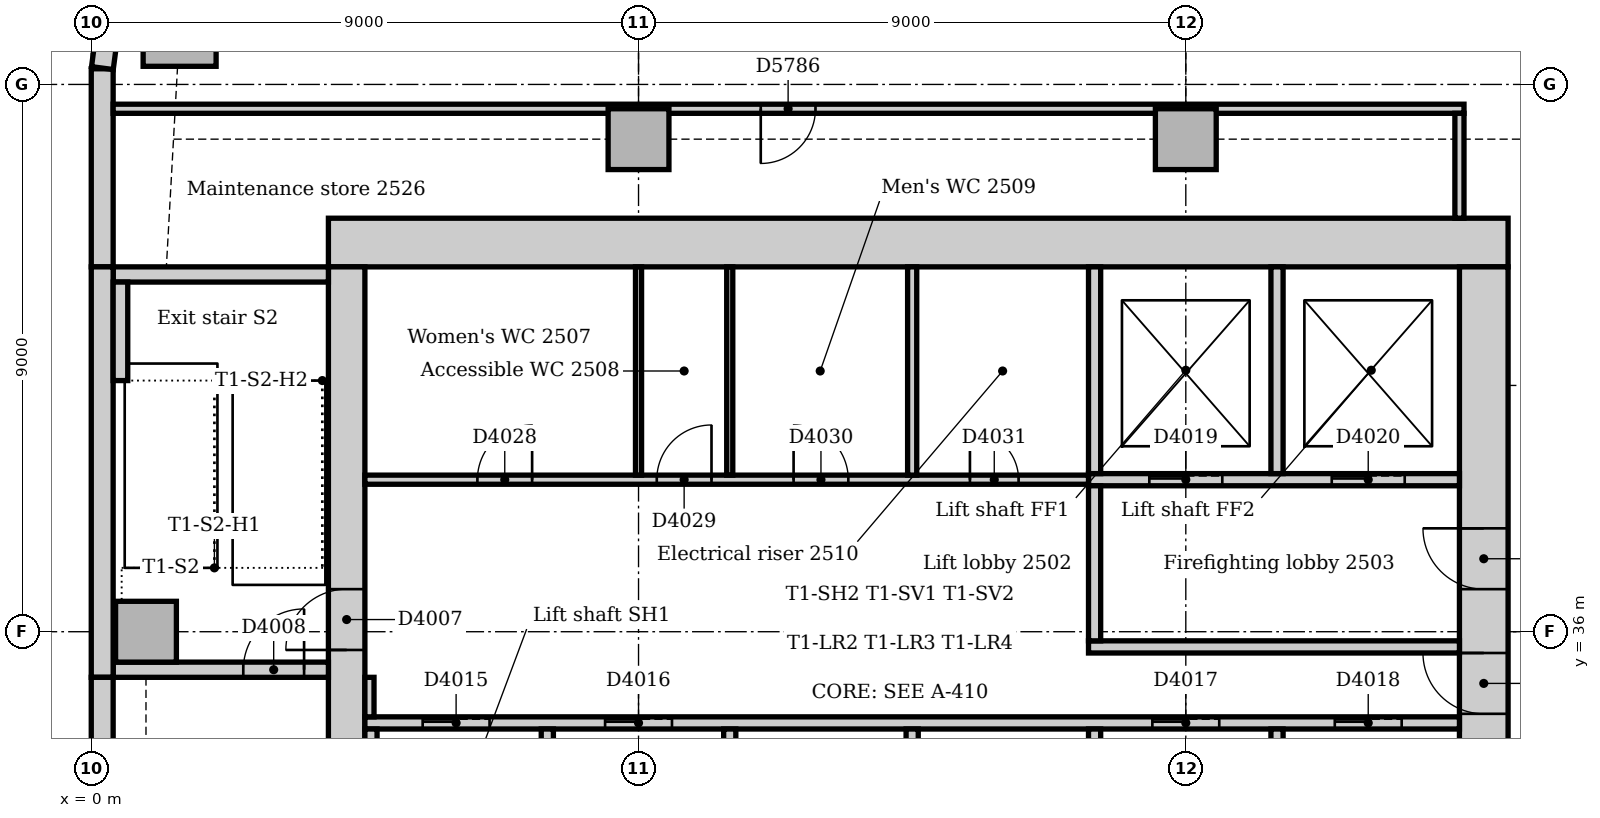
"""IFC4 building model, lengths in metres.
Left out: names, types, materials, properties, quantities, classifications, styles, units other than length and angle.
Written with IfcOpenShell. Run it as: python <this file> out.ifc"""

import sys

from ifc_helpers import new_model, si_unit, direction, frame, frame_2d, origin, origin_2d, place, context, subcontext, project, spatial, rectangle, extrude, element, fill, save


model = new_model("IFC4")
c1 = context("Model", 3, precision=1e-05, world=origin(), true_north=direction((0.0, 1.0)))
c2 = subcontext(c1, "Body", "Model", "MODEL_VIEW")
j1 = project(units=[si_unit("LENGTHUNIT", "METRE"), si_unit("PLANEANGLEUNIT", "RADIAN")], contexts=[c1])
p1 = place(None, origin())
s1 = spatial("IfcSite", under=j1, at=p1, CompositionType="ELEMENT")
p2 = place(p1, origin())
s2 = spatial("IfcBuilding", under=s1, at=p2, CompositionType="ELEMENT")
p3 = place(p2, frame((0.0, 0.0, 108.0)))
s3 = spatial("IfcBuildingStorey", under=s2, at=p3, CompositionType="ELEMENT", Elevation=108.0)
p4 = place(p3, frame((23.3, 42.4, 0.0), z_axis=(0.0, 0.0, 1.0), x_axis=(-1.0, 0.0, 0.0)))
e1 = element("IfcWall", 1, at=p4, inside=s3, PredefinedType="SOLIDWALL", context=c2, shape_type="SweptSolid", body=[
    extrude(rectangle(XDim=19.4, YDim=0.8, at=frame_2d((9.7, 0.0))), origin(), (0.0, 0.0, 1.0), 4.0),
])
p5 = place(p3, frame((22.9, 31.5, 0.0), z_axis=(0.0, 0.0, 1.0), x_axis=(0.0, 1.0, 0.0)))
e2 = element("IfcWall", 2, at=p5, inside=s3, PredefinedType="SOLIDWALL", context=c2, shape_type="SweptSolid", body=[
    extrude(rectangle(XDim=10.5, YDim=0.8, at=frame_2d((5.25, 0.0))), origin(), (0.0, 0.0, 1.0), 4.0),
])
p6 = place(p5, frame((3.15, 0.0, 0.0)))
e3 = element("IfcOpeningElement", 3, at=p6, cuts=e2, PredefinedType="OPENING", context=c2, shape_type="SweptSolid", body=[
    extrude(rectangle(XDim=1.0, YDim=2.1, at=frame_2d((0.5, 1.05))), frame((0.0, 0.41, 0.0), z_axis=(0.0, -1.0, 0.0), x_axis=(1.0, 0.0, 0.0)), (0.0, 0.0, 1.0), 0.82),
])
p7 = place(p5, frame((5.2, 0.0, 0.0)))
e4 = element("IfcOpeningElement", 4, at=p7, cuts=e2, PredefinedType="OPENING", context=c2, shape_type="SweptSolid", body=[
    extrude(rectangle(XDim=1.0, YDim=2.1, at=frame_2d((0.5, 1.05))), frame((0.0, 0.41, 0.0), z_axis=(0.0, -1.0, 0.0), x_axis=(1.0, 0.0, 0.0)), (0.0, 0.0, 1.0), 0.82),
])
p8 = place(p3, frame((4.2, 42.0, 0.0), z_axis=(0.0, 0.0, 1.0), x_axis=(0.0, -1.0, 0.0)))
e5 = element("IfcWall", 5, at=p8, inside=s3, PredefinedType="SOLIDWALL", context=c2, shape_type="SweptSolid", body=[
    extrude(rectangle(XDim=10.5, YDim=0.6, at=frame_2d((5.25, 0.0))), origin(), (0.0, 0.0, 1.0), 4.0),
])
p9 = place(p8, frame((5.3, 0.0, 0.0)))
e6 = element("IfcOpeningElement", 6, at=p9, cuts=e5, PredefinedType="OPENING", context=c2, shape_type="SweptSolid", body=[
    extrude(rectangle(XDim=1.0, YDim=2.1, at=frame_2d((0.5, 1.05))), frame((0.0, 0.31, 0.0), z_axis=(0.0, -1.0, 0.0), x_axis=(1.0, 0.0, 0.0)), (0.0, 0.0, 1.0), 0.62),
])
p10 = place(p3, frame((0.36, 35.375, 0.0), z_axis=(0.0, 0.0, 1.0), x_axis=(1.0, 0.0, 0.0)))
e7 = element("IfcWall", 7, at=p10, inside=s3, PredefinedType="SOLIDWALL", context=c2, shape_type="SweptSolid", body=[
    extrude(rectangle(XDim=3.54, YDim=0.25, at=frame_2d((1.77, 0.0))), origin(), (0.0, 0.0, 1.0), 4.0),
])
p11 = place(p10, frame((2.14, 0.0, 0.0)))
e8 = element("IfcOpeningElement", 8, at=p11, cuts=e7, PredefinedType="OPENING", context=c2, shape_type="SweptSolid", body=[
    extrude(rectangle(XDim=1.0, YDim=2.1, at=frame_2d((0.5, 1.05))), frame((0.0, 0.135, 0.0), z_axis=(0.0, -1.0, 0.0), x_axis=(1.0, 0.0, 0.0)), (0.0, 0.0, 1.0), 0.27),
])
p12 = place(p3, frame((3.9, 41.875, 0.0), z_axis=(0.0, 0.0, 1.0), x_axis=(-1.0, 0.0, 0.0)))
e9 = element("IfcWall", 9, at=p12, inside=s3, PredefinedType="SOLIDWALL", context=c2, shape_type="SweptSolid", body=[
    extrude(rectangle(XDim=3.54, YDim=0.25, at=frame_2d((1.77, 0.0))), origin(), (0.0, 0.0, 1.0), 4.0),
])
p13 = place(p3, frame((1.453, 45.898, 0.0), z_axis=(0.0, 0.0, 1.0), x_axis=(1.0, 0.0, 0.0)))
e10 = element("IfcColumn", 10, at=p13, inside=s3, PredefinedType="COLUMN", context=c2, shape_type="SweptSolid", body=[
    extrude(rectangle(XDim=1.2, YDim=1.2, at=origin_2d()), origin(), (0.0, 0.0, 1.0), 3.85),
])
p14 = place(p3, frame((0.9, 36.0, 0.0), z_axis=(0.0, 0.0, 1.0), x_axis=(1.0, 0.0, 0.0)))
e11 = element("IfcColumn", 11, at=p14, inside=s3, PredefinedType="COLUMN", context=c2, shape_type="SweptSolid", body=[
    extrude(rectangle(XDim=1.0, YDim=1.0, at=origin_2d()), origin(), (0.0, 0.0, 1.0), 4.0),
])
for number, where, z_axis, x_axis in (
    (12, (9.0, 44.1, 0.0), (0.0, 0.0, 1.0), (1.0, 0.0, 0.0)),
    (13, (18.0, 44.1, 0.0), (0.0, 0.0, 1.0), (1.0, 0.0, 0.0)),
):
    element("IfcColumn", number, at=place(p3, frame(where, z_axis=z_axis, x_axis=x_axis)), inside=s3, PredefinedType="COLUMN", context=c2, shape_type="SweptSolid", body=[
        extrude(rectangle(XDim=1.0, YDim=1.0, at=origin_2d()), origin(), (0.0, 0.0, 1.0), 3.85),
    ])
p15 = place(p3, frame((0.18, 45.257, 0.0), z_axis=(0.0, 0.0, 1.0), x_axis=(0.0, -1.0, 0.0)))
e14 = element("IfcWall", 14, at=p15, inside=s3, PredefinedType="STANDARD", context=c2, shape_type="SweptSolid", body=[
    extrude(rectangle(XDim=3.257, YDim=0.36, at=frame_2d((1.629, 0.0))), origin(), (0.0, 0.0, 1.0), 3.85),
])
p16 = place(p3, frame((0.18, 42.0, 0.0), z_axis=(0.0, 0.0, 1.0), x_axis=(0.0, -1.0, 0.0)))
e15 = element("IfcWall", 15, at=p16, inside=s3, PredefinedType="STANDARD", context=c2, shape_type="SweptSolid", body=[
    extrude(rectangle(XDim=6.75, YDim=0.36, at=frame_2d((3.375, 0.0))), origin(), (0.0, 0.0, 1.0), 3.85),
])
p17 = place(p3, frame((0.18, 35.25, 0.0), z_axis=(0.0, 0.0, 1.0), x_axis=(0.0, -1.0, 0.0)))
e16 = element("IfcWall", 16, at=p17, inside=s3, PredefinedType="STANDARD", context=c2, shape_type="SweptSolid", body=[
    extrude(rectangle(XDim=7.5, YDim=0.36, at=frame_2d((3.75, 0.0))), origin(), (0.0, 0.0, 1.0), 3.85),
])
p18 = place(p3, frame((0.276, 45.976, 0.0), z_axis=(0.0, 0.0, 1.0), x_axis=(-0.13055608231, -0.99144092581, 0.0)))
e17 = element("IfcWall", 17, at=p18, inside=s3, PredefinedType="STANDARD", context=c2, shape_type="SweptSolid", body=[
    extrude(rectangle(XDim=0.713, YDim=0.36, at=frame_2d((0.356, 0.0))), origin(), (0.0, 0.0, 1.0), 3.85),
])
p19 = place(p3, frame((0.48, 40.13, 0.0), z_axis=(0.0, 0.0, 1.0), x_axis=(0.0, 1.0, 0.0)))
e18 = element("IfcWall", 18, at=p19, inside=s3, PredefinedType="STANDARD", context=c2, shape_type="SweptSolid", body=[
    extrude(rectangle(XDim=1.62, YDim=0.24, at=frame_2d((0.81, 0.0))), origin(), (0.0, 0.0, 1.0), 4.0),
])
p20 = place(p3, frame((16.4, 35.75, 0.0), z_axis=(0.0, 0.0, 1.0), x_axis=(1.0, 0.0, 0.0)))
e19 = element("IfcWall", 19, at=p20, inside=s3, PredefinedType="PARTITIONING", context=c2, shape_type="SweptSolid", body=[
    extrude(rectangle(XDim=6.1, YDim=0.2, at=frame_2d((3.05, 0.0))), origin(), (0.0, 0.0, 1.0), 3.85),
])
p21 = place(p3, frame((16.4, 38.5, 0.0), z_axis=(0.0, 0.0, 1.0), x_axis=(1.0, 0.0, 0.0)))
e20 = element("IfcWall", 20, at=p21, inside=s3, PredefinedType="PARTITIONING", context=c2, shape_type="SweptSolid", body=[
    extrude(rectangle(XDim=6.1, YDim=0.2, at=frame_2d((3.05, 0.0))), origin(), (0.0, 0.0, 1.0), 3.85),
])
p22 = place(p21, frame((1.0, 0.0, 0.0)))
e21 = element("IfcOpeningElement", 21, at=p22, cuts=e20, PredefinedType="OPENING", context=c2, shape_type="SweptSolid", body=[
    extrude(rectangle(XDim=1.2, YDim=2.1, at=frame_2d((0.6, 1.05))), frame((0.0, 0.11, 0.0), z_axis=(0.0, -1.0, 0.0), x_axis=(1.0, 0.0, 0.0)), (0.0, 0.0, 1.0), 0.22),
])
p23 = place(p21, frame((4.0, 0.0, 0.0)))
e22 = element("IfcOpeningElement", 22, at=p23, cuts=e20, PredefinedType="OPENING", context=c2, shape_type="SweptSolid", body=[
    extrude(rectangle(XDim=1.2, YDim=2.1, at=frame_2d((0.6, 1.05))), frame((0.0, 0.11, 0.0), z_axis=(0.0, -1.0, 0.0), x_axis=(1.0, 0.0, 0.0)), (0.0, 0.0, 1.0), 0.22),
])
p24 = place(p3, frame((16.5, 35.85, 0.0), z_axis=(0.0, 0.0, 1.0), x_axis=(0.0, 1.0, 0.0)))
e23 = element("IfcWall", 23, at=p24, inside=s3, PredefinedType="PARTITIONING", context=c2, shape_type="SweptSolid", body=[
    extrude(rectangle(XDim=2.55, YDim=0.2, at=frame_2d((1.275, 0.0))), origin(), (0.0, 0.0, 1.0), 3.85),
])
p25 = place(p3, frame((4.5, 34.5, 0.0), z_axis=(0.0, 0.0, 1.0), x_axis=(1.0, 0.0, 0.0)))
e24 = element("IfcWall", 24, at=p25, inside=s3, PredefinedType="PARTITIONING", context=c2, shape_type="SweptSolid", body=[
    extrude(rectangle(XDim=18.0, YDim=0.2, at=frame_2d((9.0, 0.0))), origin(), (0.0, 0.0, 1.0), 3.85),
])
p26 = place(p25, frame((0.95, 0.0, 0.0)))
e25 = element("IfcOpeningElement", 25, at=p26, cuts=e24, PredefinedType="OPENING", context=c2, shape_type="SweptSolid", body=[
    extrude(rectangle(XDim=1.1, YDim=2.1, at=frame_2d((0.55, 1.05))), frame((0.0, 0.11, 0.0), z_axis=(0.0, -1.0, 0.0), x_axis=(1.0, 0.0, 0.0)), (0.0, 0.0, 1.0), 0.22),
])
p27 = place(p25, frame((3.95, 0.0, 0.0)))
e26 = element("IfcOpeningElement", 26, at=p27, cuts=e24, PredefinedType="OPENING", context=c2, shape_type="SweptSolid", body=[
    extrude(rectangle(XDim=1.1, YDim=2.1, at=frame_2d((0.55, 1.05))), frame((0.0, 0.11, 0.0), z_axis=(0.0, -1.0, 0.0), x_axis=(1.0, 0.0, 0.0)), (0.0, 0.0, 1.0), 0.22),
])
p28 = place(p25, frame((12.95, 0.0, 0.0)))
e27 = element("IfcOpeningElement", 27, at=p28, cuts=e24, PredefinedType="OPENING", context=c2, shape_type="SweptSolid", body=[
    extrude(rectangle(XDim=1.1, YDim=2.1, at=frame_2d((0.55, 1.05))), frame((0.0, 0.11, 0.0), z_axis=(0.0, -1.0, 0.0), x_axis=(1.0, 0.0, 0.0)), (0.0, 0.0, 1.0), 0.22),
])
p29 = place(p25, frame((15.95, 0.0, 0.0)))
e28 = element("IfcOpeningElement", 28, at=p29, cuts=e24, PredefinedType="OPENING", context=c2, shape_type="SweptSolid", body=[
    extrude(rectangle(XDim=1.1, YDim=2.1, at=frame_2d((0.55, 1.05))), frame((0.0, 0.11, 0.0), z_axis=(0.0, -1.0, 0.0), x_axis=(1.0, 0.0, 0.0)), (0.0, 0.0, 1.0), 0.22),
])
for number, where, z_axis, x_axis in (
    (29, (16.5, 38.6, 0.0), (0.0, 0.0, 1.0), (0.0, 1.0, 0.0)),
    (30, (19.5, 38.6, 0.0), (0.0, 0.0, 1.0), (0.0, 1.0, 0.0)),
):
    element("IfcWall", number, at=place(p3, frame(where, z_axis=z_axis, x_axis=x_axis)), inside=s3, PredefinedType="PARTITIONING", context=c2, shape_type="SweptSolid", body=[
        extrude(rectangle(XDim=3.4, YDim=0.2, at=frame_2d((1.7, 0.0))), origin(), (0.0, 0.0, 1.0), 3.85),
    ])
for number, where, z_axis, x_axis in (
    (31, (4.6, 31.75, 0.0), (0.0, 0.0, 1.0), (0.0, 1.0, 0.0)),
    (32, (7.5, 31.75, 0.0), (0.0, 0.0, 1.0), (0.0, 1.0, 0.0)),
    (33, (10.5, 31.75, 0.0), (0.0, 0.0, 1.0), (0.0, 1.0, 0.0)),
    (34, (13.5, 31.75, 0.0), (0.0, 0.0, 1.0), (0.0, 1.0, 0.0)),
    (35, (16.5, 31.75, 0.0), (0.0, 0.0, 1.0), (0.0, 1.0, 0.0)),
    (36, (19.5, 31.75, 0.0), (0.0, 0.0, 1.0), (0.0, 1.0, 0.0)),
):
    element("IfcWall", number, at=place(p3, frame(where, z_axis=z_axis, x_axis=x_axis)), inside=s3, PredefinedType="PARTITIONING", context=c2, shape_type="SweptSolid", body=[
        extrude(rectangle(XDim=2.65, YDim=0.2, at=frame_2d((1.325, 0.0))), origin(), (0.0, 0.0, 1.0), 3.85),
    ])
p30 = place(p3, frame((0.36, 44.6, 0.0), z_axis=(0.0, 0.0, 1.0), x_axis=(1.0, 0.0, 0.0)))
e37 = element("IfcWall", 37, at=p30, inside=s3, PredefinedType="PARTITIONING", context=c2, shape_type="SweptSolid", body=[
    extrude(rectangle(XDim=22.215, YDim=0.15, at=frame_2d((11.107, 0.0))), origin(), (0.0, 0.0, 1.0), 3.85),
])
p31 = place(p30, frame((10.65, 0.0, 0.0)))
e38 = element("IfcOpeningElement", 38, at=p31, cuts=e37, PredefinedType="OPENING", context=c2, shape_type="SweptSolid", body=[
    extrude(rectangle(XDim=0.9, YDim=2.1, at=frame_2d((0.45, 1.05))), frame((0.0, 0.085, 0.0), z_axis=(0.0, -1.0, 0.0), x_axis=(1.0, 0.0, 0.0)), (0.0, 0.0, 1.0), 0.17),
])
p32 = place(p3, frame((4.5, 38.5, 0.0), z_axis=(0.0, 0.0, 1.0), x_axis=(1.0, 0.0, 0.0)))
e39 = element("IfcWall", 39, at=p32, inside=s3, PredefinedType="PARTITIONING", context=c2, shape_type="SweptSolid", body=[
    extrude(rectangle(XDim=11.9, YDim=0.15, at=frame_2d((5.95, 0.0))), origin(), (0.0, 0.0, 1.0), 3.85),
])
p33 = place(p32, frame((1.85, 0.0, 0.0)))
e40 = element("IfcOpeningElement", 40, at=p33, cuts=e39, PredefinedType="OPENING", context=c2, shape_type="SweptSolid", body=[
    extrude(rectangle(XDim=0.9, YDim=2.1, at=frame_2d((0.45, 1.05))), frame((0.0, 0.085, 0.0), z_axis=(0.0, -1.0, 0.0), x_axis=(1.0, 0.0, 0.0)), (0.0, 0.0, 1.0), 0.17),
])
p34 = place(p32, frame((4.8, 0.0, 0.0)))
e41 = element("IfcOpeningElement", 41, at=p34, cuts=e39, PredefinedType="OPENING", context=c2, shape_type="SweptSolid", body=[
    extrude(rectangle(XDim=0.9, YDim=2.1, at=frame_2d((0.45, 1.05))), frame((0.0, 0.085, 0.0), z_axis=(0.0, -1.0, 0.0), x_axis=(1.0, 0.0, 0.0)), (0.0, 0.0, 1.0), 0.17),
])
p35 = place(p32, frame((7.05, 0.0, 0.0)))
e42 = element("IfcOpeningElement", 42, at=p35, cuts=e39, PredefinedType="OPENING", context=c2, shape_type="SweptSolid", body=[
    extrude(rectangle(XDim=0.9, YDim=2.1, at=frame_2d((0.45, 1.05))), frame((0.0, 0.085, 0.0), z_axis=(0.0, -1.0, 0.0), x_axis=(1.0, 0.0, 0.0)), (0.0, 0.0, 1.0), 0.17),
])
p36 = place(p32, frame((9.95, 0.0, 0.0)))
e43 = element("IfcOpeningElement", 43, at=p36, cuts=e39, PredefinedType="OPENING", context=c2, shape_type="SweptSolid", body=[
    extrude(rectangle(XDim=0.8, YDim=2.1, at=frame_2d((0.4, 1.05))), frame((0.0, 0.085, 0.0), z_axis=(0.0, -1.0, 0.0), x_axis=(1.0, 0.0, 0.0)), (0.0, 0.0, 1.0), 0.17),
])
p37 = place(p3, frame((22.5, 42.8, 0.0), z_axis=(0.0, 0.0, 1.0), x_axis=(0.0, 1.0, 0.0)))
e44 = element("IfcWall", 44, at=p37, inside=s3, PredefinedType="PARTITIONING", context=c2, shape_type="SweptSolid", body=[
    extrude(rectangle(XDim=1.725, YDim=0.15, at=frame_2d((0.863, 0.0))), origin(), (0.0, 0.0, 1.0), 3.85),
])
p38 = place(p3, frame((4.575, 34.6, 0.0), z_axis=(0.0, 0.0, 1.0), x_axis=(0.0, 1.0, 0.0)))
e45 = element("IfcWall", 45, at=p38, inside=s3, PredefinedType="PARTITIONING", context=c2, shape_type="SweptSolid", body=[
    extrude(rectangle(XDim=0.65, YDim=0.15, at=frame_2d((0.325, 0.0))), origin(), (0.0, 0.0, 1.0), 3.85),
])
p39 = place(p3, frame((13.5, 38.575, 0.0), z_axis=(0.0, 0.0, 1.0), x_axis=(0.0, 1.0, 0.0)))
e46 = element("IfcWall", 46, at=p39, inside=s3, PredefinedType="PARTITIONING", context=c2, shape_type="SweptSolid", body=[
    extrude(rectangle(XDim=3.425, YDim=0.15, at=frame_2d((1.712, 0.0))), origin(), (0.0, 0.0, 1.0), 3.85),
])
for number, where, z_axis, x_axis in (
    (47, (9.0, 38.575, 0.0), (0.0, 0.0, 1.0), (0.0, 1.0, 0.0)),
    (48, (10.5, 38.575, 0.0), (0.0, 0.0, 1.0), (0.0, 1.0, 0.0)),
):
    element("IfcWall", number, at=place(p3, frame(where, z_axis=z_axis, x_axis=x_axis)), inside=s3, PredefinedType="PARTITIONING", context=c2, shape_type="SweptSolid", body=[
        extrude(rectangle(XDim=3.425, YDim=0.1, at=frame_2d((1.712, 0.0))), origin(), (0.0, 0.0, 1.0), 3.85),
    ])
p40 = place(p9, frame((1.0, 0.0, 0.0), z_axis=(0.0, 0.0, 1.0), x_axis=(-1.0, 0.0, 0.0)))
e49 = element("IfcDoor", 49, at=p40, inside=s3, OperationType="SINGLE_SWING_LEFT", PredefinedType="DOOR", context=c2, shape_type="SweptSolid", body=[
    extrude(rectangle(XDim=1.0, YDim=2.1, at=frame_2d((0.5, 1.05))), frame((0.0, 0.025, 0.0), z_axis=(0.0, -1.0, 0.0), x_axis=(1.0, 0.0, 0.0)), (0.0, 0.0, 1.0), 0.05),
])
fill(e6, e49)
p41 = place(p11, origin())
e50 = element("IfcDoor", 50, at=p41, inside=s3, OperationType="SINGLE_SWING_RIGHT", PredefinedType="DOOR", context=c2, shape_type="SweptSolid", body=[
    extrude(rectangle(XDim=1.0, YDim=2.1, at=frame_2d((0.5, 1.05))), frame((0.0, 0.025, 0.0), z_axis=(0.0, -1.0, 0.0), x_axis=(1.0, 0.0, 0.0)), (0.0, 0.0, 1.0), 0.05),
])
fill(e8, e50)
p42 = place(p26, origin())
e51 = element("IfcDoor", 51, at=p42, inside=s3, OperationType="SLIDING_TO_LEFT", PredefinedType="DOOR", context=c2, shape_type="SweptSolid", body=[
    extrude(rectangle(XDim=1.1, YDim=2.1, at=frame_2d((0.55, 1.05))), frame((0.0, 0.025, 0.0), z_axis=(0.0, -1.0, 0.0), x_axis=(1.0, 0.0, 0.0)), (0.0, 0.0, 1.0), 0.05),
])
fill(e25, e51)
p43 = place(p27, origin())
e52 = element("IfcDoor", 52, at=p43, inside=s3, OperationType="SLIDING_TO_LEFT", PredefinedType="DOOR", context=c2, shape_type="SweptSolid", body=[
    extrude(rectangle(XDim=1.1, YDim=2.1, at=frame_2d((0.55, 1.05))), frame((0.0, 0.025, 0.0), z_axis=(0.0, -1.0, 0.0), x_axis=(1.0, 0.0, 0.0)), (0.0, 0.0, 1.0), 0.05),
])
fill(e26, e52)
p44 = place(p28, origin())
e53 = element("IfcDoor", 53, at=p44, inside=s3, OperationType="SLIDING_TO_LEFT", PredefinedType="DOOR", context=c2, shape_type="SweptSolid", body=[
    extrude(rectangle(XDim=1.1, YDim=2.1, at=frame_2d((0.55, 1.05))), frame((0.0, 0.025, 0.0), z_axis=(0.0, -1.0, 0.0), x_axis=(1.0, 0.0, 0.0)), (0.0, 0.0, 1.0), 0.05),
])
fill(e27, e53)
p45 = place(p29, origin())
e54 = element("IfcDoor", 54, at=p45, inside=s3, OperationType="SLIDING_TO_LEFT", PredefinedType="DOOR", context=c2, shape_type="SweptSolid", body=[
    extrude(rectangle(XDim=1.1, YDim=2.1, at=frame_2d((0.55, 1.05))), frame((0.0, 0.025, 0.0), z_axis=(0.0, -1.0, 0.0), x_axis=(1.0, 0.0, 0.0)), (0.0, 0.0, 1.0), 0.05),
])
fill(e28, e54)
p46 = place(p22, origin())
e55 = element("IfcDoor", 55, at=p46, inside=s3, OperationType="SLIDING_TO_LEFT", PredefinedType="DOOR", context=c2, shape_type="SweptSolid", body=[
    extrude(rectangle(XDim=1.2, YDim=2.1, at=frame_2d((0.6, 1.05))), frame((0.0, 0.025, 0.0), z_axis=(0.0, -1.0, 0.0), x_axis=(1.0, 0.0, 0.0)), (0.0, 0.0, 1.0), 0.05),
])
fill(e21, e55)
p47 = place(p23, origin())
e56 = element("IfcDoor", 56, at=p47, inside=s3, OperationType="SLIDING_TO_LEFT", PredefinedType="DOOR", context=c2, shape_type="SweptSolid", body=[
    extrude(rectangle(XDim=1.2, YDim=2.1, at=frame_2d((0.6, 1.05))), frame((0.0, 0.025, 0.0), z_axis=(0.0, -1.0, 0.0), x_axis=(1.0, 0.0, 0.0)), (0.0, 0.0, 1.0), 0.05),
])
fill(e22, e56)
p48 = place(p6, origin())
e57 = element("IfcDoor", 57, at=p48, inside=s3, OperationType="SINGLE_SWING_RIGHT", PredefinedType="DOOR", context=c2, shape_type="SweptSolid", body=[
    extrude(rectangle(XDim=1.0, YDim=2.1, at=frame_2d((0.5, 1.05))), frame((0.0, 0.025, 0.0), z_axis=(0.0, -1.0, 0.0), x_axis=(1.0, 0.0, 0.0)), (0.0, 0.0, 1.0), 0.05),
])
fill(e3, e57)
p49 = place(p7, origin())
e58 = element("IfcDoor", 58, at=p49, inside=s3, OperationType="SINGLE_SWING_RIGHT", PredefinedType="DOOR", context=c2, shape_type="SweptSolid", body=[
    extrude(rectangle(XDim=1.0, YDim=2.1, at=frame_2d((0.5, 1.05))), frame((0.0, 0.025, 0.0), z_axis=(0.0, -1.0, 0.0), x_axis=(1.0, 0.0, 0.0)), (0.0, 0.0, 1.0), 0.05),
])
fill(e4, e58)
p50 = place(p33, origin())
e59 = element("IfcDoor", 59, at=p50, inside=s3, OperationType="SINGLE_SWING_RIGHT", PredefinedType="DOOR", context=c2, shape_type="SweptSolid", body=[
    extrude(rectangle(XDim=0.9, YDim=2.1, at=frame_2d((0.45, 1.05))), frame((0.0, 0.025, 0.0), z_axis=(0.0, -1.0, 0.0), x_axis=(1.0, 0.0, 0.0)), (0.0, 0.0, 1.0), 0.05),
])
fill(e40, e59)
p51 = place(p34, origin())
e60 = element("IfcDoor", 60, at=p51, inside=s3, OperationType="SINGLE_SWING_RIGHT", PredefinedType="DOOR", context=c2, shape_type="SweptSolid", body=[
    extrude(rectangle(XDim=0.9, YDim=2.1, at=frame_2d((0.45, 1.05))), frame((0.0, 0.025, 0.0), z_axis=(0.0, -1.0, 0.0), x_axis=(1.0, 0.0, 0.0)), (0.0, 0.0, 1.0), 0.05),
])
fill(e41, e60)
p52 = place(p35, origin())
e61 = element("IfcDoor", 61, at=p52, inside=s3, OperationType="SINGLE_SWING_LEFT", PredefinedType="DOOR", context=c2, shape_type="SweptSolid", body=[
    extrude(rectangle(XDim=0.9, YDim=2.1, at=frame_2d((0.45, 1.05))), frame((0.0, 0.025, 0.0), z_axis=(0.0, -1.0, 0.0), x_axis=(1.0, 0.0, 0.0)), (0.0, 0.0, 1.0), 0.05),
])
fill(e42, e61)
p53 = place(p36, origin())
e62 = element("IfcDoor", 62, at=p53, inside=s3, OperationType="SINGLE_SWING_LEFT", PredefinedType="DOOR", context=c2, shape_type="SweptSolid", body=[
    extrude(rectangle(XDim=0.8, YDim=2.1, at=frame_2d((0.4, 1.05))), frame((0.0, 0.025, 0.0), z_axis=(0.0, -1.0, 0.0), x_axis=(1.0, 0.0, 0.0)), (0.0, 0.0, 1.0), 0.05),
])
fill(e43, e62)
p54 = place(p31, frame((0.9, 0.0, 0.0), z_axis=(0.0, 0.0, 1.0), x_axis=(-1.0, 0.0, 0.0)))
e63 = element("IfcDoor", 63, at=p54, inside=s3, OperationType="SINGLE_SWING_RIGHT", PredefinedType="DOOR", context=c2, shape_type="SweptSolid", body=[
    extrude(rectangle(XDim=0.9, YDim=2.1, at=frame_2d((0.45, 1.05))), frame((0.0, 0.025, 0.0), z_axis=(0.0, -1.0, 0.0), x_axis=(1.0, 0.0, 0.0)), (0.0, 0.0, 1.0), 0.05),
])
fill(e38, e63)
save(model, sys.argv[1])
